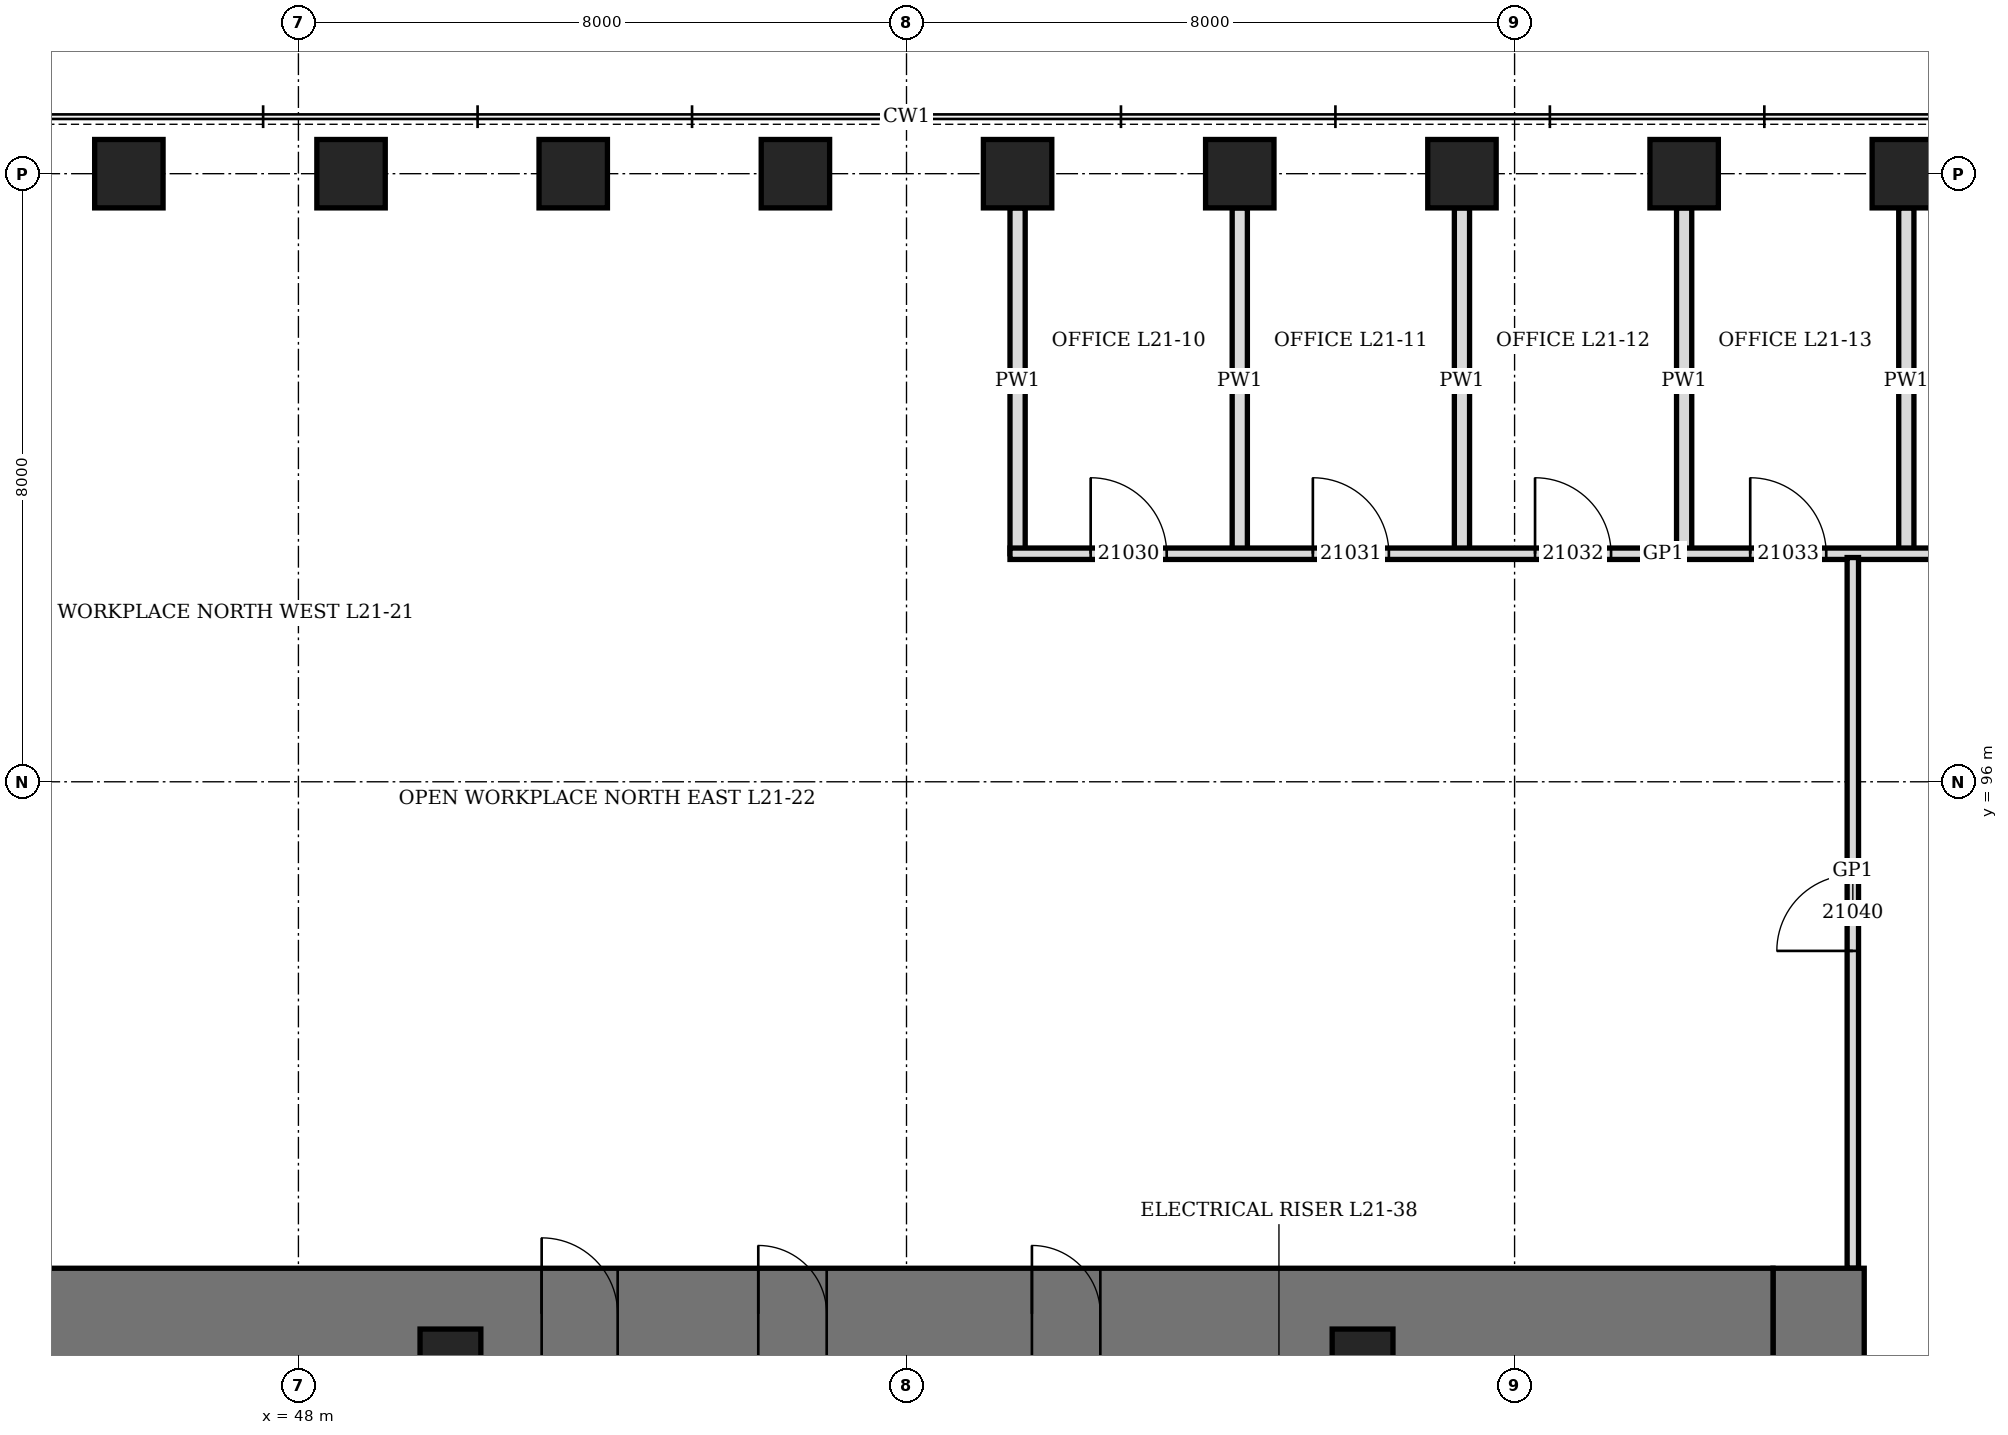
"""IFC4 building model, lengths in metres.
Left out: names, types, materials, properties, quantities, classifications, styles, units other than length and angle.
Written with IfcOpenShell. Run it as: python <this file> out.ifc"""

import sys

from ifc_helpers import new_model, si_unit, direction, frame, frame_2d, origin, origin_2d, place, context, subcontext, project, spatial, rectangle, hollow_rectangle, extrude, element, fill, save


model = new_model("IFC4")
c1 = context("Model", 3, precision=1e-05, world=origin(), true_north=direction((0.0, 1.0)))
c2 = subcontext(c1, "Body", "Model", "MODEL_VIEW")
j1 = project(units=[si_unit("LENGTHUNIT", "METRE"), si_unit("PLANEANGLEUNIT", "RADIAN")], contexts=[c1])
p1 = place(None, origin())
s1 = spatial("IfcSite", under=j1, at=p1, CompositionType="ELEMENT")
p2 = place(p1, origin())
s2 = spatial("IfcBuilding", under=s1, at=p2, CompositionType="ELEMENT")
p3 = place(p2, frame((0.0, 0.0, 97.9)))
s3 = spatial("IfcBuildingStorey", under=s2, at=p3, CompositionType="ELEMENT", Elevation=97.9)
for number, where, z_axis, x_axis in (
    (1, (69.154, 104.0, 0.0), (0.0, 0.0, 1.0), (1.0, 0.0, 0.0)),
    (2, (66.231, 104.0, 0.0), (0.0, 0.0, 1.0), (1.0, 0.0, 0.0)),
    (3, (63.308, 104.0, 0.0), (0.0, 0.0, 1.0), (1.0, 0.0, 0.0)),
    (4, (60.385, 104.0, 0.0), (0.0, 0.0, 1.0), (1.0, 0.0, 0.0)),
    (5, (57.461, 104.0, 0.0), (0.0, 0.0, 1.0), (1.0, 0.0, 0.0)),
    (6, (54.539, 104.0, 0.0), (0.0, 0.0, 1.0), (1.0, 0.0, 0.0)),
    (7, (51.615, 104.0, 0.0), (0.0, 0.0, 1.0), (1.0, 0.0, 0.0)),
    (8, (48.692, 104.0, 0.0), (0.0, 0.0, 1.0), (1.0, 0.0, 0.0)),
    (9, (45.769, 104.0, 0.0), (0.0, 0.0, 1.0), (1.0, 0.0, 0.0)),
):
    element("IfcColumn", number, at=place(p3, frame(where, z_axis=z_axis, x_axis=x_axis)), inside=s3, PredefinedType="COLUMN", context=c2, shape_type="SweptSolid", body=[
        extrude(hollow_rectangle(XDim=0.9, YDim=0.9, WallThickness=0.12, at=origin_2d()), origin(), (0.0, 0.0, 1.0), 4.2),
    ])
p4 = place(p3, frame((68.0, 70.4, 0.0), z_axis=(0.0, 0.0, 1.0), x_axis=(0.0, 1.0, 0.0)))
e10 = element("IfcWall", 10, at=p4, inside=s3, PredefinedType="SHEAR", context=c2, shape_type="SweptSolid", body=[
    extrude(rectangle(XDim=19.2, YDim=1.2, at=frame_2d((9.6, 0.0))), origin(), (0.0, 0.0, 1.0), 4.2),
])
p5 = place(p4, frame((8.6, 0.0, 0.0)))
e11 = element("IfcOpeningElement", 11, at=p5, cuts=e10, PredefinedType="OPENING", context=c2, shape_type="SweptSolid", body=[
    extrude(rectangle(XDim=2.0, YDim=2.4, at=frame_2d((1.0, 1.2))), frame((0.0, 0.61, 0.0), z_axis=(0.0, -1.0, 0.0), x_axis=(1.0, 0.0, 0.0)), (0.0, 0.0, 1.0), 1.22),
])
p6 = place(p3, frame((44.6, 89.0, 0.0), z_axis=(0.0, 0.0, 1.0), x_axis=(1.0, 0.0, 0.0)))
e12 = element("IfcWall", 12, at=p6, inside=s3, PredefinedType="SHEAR", context=c2, shape_type="SweptSolid", body=[
    extrude(rectangle(XDim=22.8, YDim=1.2, at=frame_2d((11.4, 0.0))), origin(), (0.0, 0.0, 1.0), 4.2),
])
p7 = place(p6, frame((6.6, 0.0, 0.0)))
e13 = element("IfcOpeningElement", 13, at=p7, cuts=e12, PredefinedType="OPENING", context=c2, shape_type="SweptSolid", body=[
    extrude(rectangle(XDim=1.0, YDim=2.1, at=frame_2d((0.5, 1.05))), frame((0.0, 0.61, 0.0), z_axis=(0.0, -1.0, 0.0), x_axis=(1.0, 0.0, 0.0)), (0.0, 0.0, 1.0), 1.22),
])
p8 = place(p6, frame((9.45, 0.0, 0.0)))
e14 = element("IfcOpeningElement", 14, at=p8, cuts=e12, PredefinedType="OPENING", context=c2, shape_type="SweptSolid", body=[
    extrude(rectangle(XDim=0.9, YDim=2.1, at=frame_2d((0.45, 1.05))), frame((0.0, 0.61, 0.0), z_axis=(0.0, -1.0, 0.0), x_axis=(1.0, 0.0, 0.0)), (0.0, 0.0, 1.0), 1.22),
])
p9 = place(p6, frame((13.05, 0.0, 0.0)))
e15 = element("IfcOpeningElement", 15, at=p9, cuts=e12, PredefinedType="OPENING", context=c2, shape_type="SweptSolid", body=[
    extrude(rectangle(XDim=0.9, YDim=2.1, at=frame_2d((0.45, 1.05))), frame((0.0, 0.61, 0.0), z_axis=(0.0, -1.0, 0.0), x_axis=(1.0, 0.0, 0.0)), (0.0, 0.0, 1.0), 1.22),
])
for number, where, z_axis, x_axis in (
    (16, (50.0, 88.4, 0.0), (0.0, 0.0, 1.0), (1.0, 0.0, 0.0)),
    (17, (62.0, 88.4, 0.0), (0.0, 0.0, 1.0), (1.0, 0.0, 0.0)),
):
    element("IfcColumn", number, at=place(p3, frame(where, z_axis=z_axis, x_axis=x_axis)), inside=s3, PredefinedType="COLUMN", context=c2, shape_type="SweptSolid", body=[
        extrude(hollow_rectangle(XDim=0.8, YDim=0.8, WallThickness=0.1, at=origin_2d()), origin(), (0.0, 0.0, 1.0), 4.2),
    ])
for number, where, z_axis, x_axis in (
    (18, (57.461, 99.0, 0.0), (0.0, 0.0, 1.0), (0.0, 1.0, 0.0)),
    (19, (60.385, 99.0, 0.0), (0.0, 0.0, 1.0), (0.0, 1.0, 0.0)),
    (20, (63.308, 99.0, 0.0), (0.0, 0.0, 1.0), (0.0, 1.0, 0.0)),
    (21, (66.231, 99.0, 0.0), (0.0, 0.0, 1.0), (0.0, 1.0, 0.0)),
    (22, (69.154, 99.0, 0.0), (0.0, 0.0, 1.0), (0.0, 1.0, 0.0)),
):
    element("IfcWall", number, at=place(p3, frame(where, z_axis=z_axis, x_axis=x_axis)), inside=s3, PredefinedType="PARTITIONING", context=c2, shape_type="SweptSolid", body=[
        extrude(rectangle(XDim=4.55, YDim=0.2, at=frame_2d((2.275, 0.0))), origin(), (0.0, 0.0, 1.0), 1.95),
    ])
p10 = place(p3, frame((57.362, 99.0, 0.0), z_axis=(0.0, 0.0, 1.0), x_axis=(1.0, 0.0, 0.0)))
e23 = element("IfcWall", 23, at=p10, inside=s3, PredefinedType="PARTITIONING", context=c2, shape_type="SweptSolid", body=[
    extrude(rectangle(XDim=17.188, YDim=0.15, at=frame_2d((8.594, 0.0))), origin(), (0.0, 0.0, 1.0), 3.95),
])
p11 = place(p10, frame((1.062, 0.0, 0.0)))
e24 = element("IfcOpeningElement", 24, at=p11, cuts=e23, PredefinedType="OPENING", context=c2, shape_type="SweptSolid", body=[
    extrude(rectangle(XDim=1.0, YDim=2.1, at=frame_2d((0.5, 1.05))), frame((0.0, 0.085, 0.0), z_axis=(0.0, -1.0, 0.0), x_axis=(1.0, 0.0, 0.0)), (0.0, 0.0, 1.0), 0.17),
])
p12 = place(p10, frame((3.985, 0.0, 0.0)))
e25 = element("IfcOpeningElement", 25, at=p12, cuts=e23, PredefinedType="OPENING", context=c2, shape_type="SweptSolid", body=[
    extrude(rectangle(XDim=1.0, YDim=2.1, at=frame_2d((0.5, 1.05))), frame((0.0, 0.085, 0.0), z_axis=(0.0, -1.0, 0.0), x_axis=(1.0, 0.0, 0.0)), (0.0, 0.0, 1.0), 0.17),
])
p13 = place(p10, frame((6.908, 0.0, 0.0)))
e26 = element("IfcOpeningElement", 26, at=p13, cuts=e23, PredefinedType="OPENING", context=c2, shape_type="SweptSolid", body=[
    extrude(rectangle(XDim=1.0, YDim=2.1, at=frame_2d((0.5, 1.05))), frame((0.0, 0.085, 0.0), z_axis=(0.0, -1.0, 0.0), x_axis=(1.0, 0.0, 0.0)), (0.0, 0.0, 1.0), 0.17),
])
p14 = place(p10, frame((9.739, 0.0, 0.0)))
e27 = element("IfcOpeningElement", 27, at=p14, cuts=e23, PredefinedType="OPENING", context=c2, shape_type="SweptSolid", body=[
    extrude(rectangle(XDim=1.0, YDim=2.1, at=frame_2d((0.5, 1.05))), frame((0.0, 0.085, 0.0), z_axis=(0.0, -1.0, 0.0), x_axis=(1.0, 0.0, 0.0)), (0.0, 0.0, 1.0), 0.17),
])
p15 = place(p10, frame((12.754, 0.0, 0.0)))
e28 = element("IfcOpeningElement", 28, at=p15, cuts=e23, PredefinedType="OPENING", context=c2, shape_type="SweptSolid", body=[
    extrude(rectangle(XDim=1.0, YDim=2.1, at=frame_2d((0.5, 1.05))), frame((0.0, 0.085, 0.0), z_axis=(0.0, -1.0, 0.0), x_axis=(1.0, 0.0, 0.0)), (0.0, 0.0, 1.0), 0.17),
])
p16 = place(p10, frame((15.677, 0.0, 0.0)))
e29 = element("IfcOpeningElement", 29, at=p16, cuts=e23, PredefinedType="OPENING", context=c2, shape_type="SweptSolid", body=[
    extrude(rectangle(XDim=1.0, YDim=2.4, at=frame_2d((0.5, 1.2))), frame((0.0, 0.085, 0.0), z_axis=(0.0, -1.0, 0.0), x_axis=(1.0, 0.0, 0.0)), (0.0, 0.0, 1.0), 0.17),
])
p17 = place(p3, frame((68.45, 89.6, 0.0), z_axis=(0.0, 0.0, 1.0), x_axis=(0.0, 1.0, 0.0)))
e30 = element("IfcWall", 30, at=p17, inside=s3, PredefinedType="PARTITIONING", context=c2, shape_type="SweptSolid", body=[
    extrude(rectangle(XDim=9.35, YDim=0.15, at=frame_2d((4.675, 0.0))), origin(), (0.0, 0.0, 1.0), 3.95),
])
p18 = place(p17, frame((4.175, 0.0, 0.0)))
e31 = element("IfcOpeningElement", 31, at=p18, cuts=e30, PredefinedType="OPENING", context=c2, shape_type="SweptSolid", body=[
    extrude(rectangle(XDim=1.0, YDim=2.4, at=frame_2d((0.5, 1.2))), frame((0.0, 0.085, 0.0), z_axis=(0.0, -1.0, 0.0), x_axis=(1.0, 0.0, 0.0)), (0.0, 0.0, 1.0), 0.17),
])
p19 = place(p7, origin())
e32 = element("IfcDoor", 32, at=p19, inside=s3, OperationType="SINGLE_SWING_LEFT", PredefinedType="DOOR", context=c2, shape_type="SweptSolid", body=[
    extrude(rectangle(XDim=1.0, YDim=2.1, at=frame_2d((0.5, 1.05))), frame((0.0, 0.35, 0.0), z_axis=(0.0, -1.0, 0.0), x_axis=(1.0, 0.0, 0.0)), (0.0, 0.0, 1.0), 0.7),
])
fill(e13, e32)
p20 = place(p8, origin())
e33 = element("IfcDoor", 33, at=p20, inside=s3, OperationType="SINGLE_SWING_LEFT", PredefinedType="DOOR", context=c2, shape_type="SweptSolid", body=[
    extrude(rectangle(XDim=0.9, YDim=2.1, at=frame_2d((0.45, 1.05))), frame((0.0, 0.35, 0.0), z_axis=(0.0, -1.0, 0.0), x_axis=(1.0, 0.0, 0.0)), (0.0, 0.0, 1.0), 0.7),
])
fill(e14, e33)
p21 = place(p9, origin())
e34 = element("IfcDoor", 34, at=p21, inside=s3, OperationType="SINGLE_SWING_LEFT", PredefinedType="DOOR", context=c2, shape_type="SweptSolid", body=[
    extrude(rectangle(XDim=0.9, YDim=2.1, at=frame_2d((0.45, 1.05))), frame((0.0, 0.35, 0.0), z_axis=(0.0, -1.0, 0.0), x_axis=(1.0, 0.0, 0.0)), (0.0, 0.0, 1.0), 0.7),
])
fill(e15, e34)
p22 = place(p11, origin())
e35 = element("IfcDoor", 35, at=p22, inside=s3, OperationType="SINGLE_SWING_LEFT", PredefinedType="DOOR", context=c2, shape_type="SweptSolid", body=[
    extrude(rectangle(XDim=1.0, YDim=2.1, at=frame_2d((0.5, 1.05))), frame((0.0, 0.075, 0.0), z_axis=(0.0, -1.0, 0.0), x_axis=(1.0, 0.0, 0.0)), (0.0, 0.0, 1.0), 0.149),
])
fill(e24, e35)
p23 = place(p12, origin())
e36 = element("IfcDoor", 36, at=p23, inside=s3, OperationType="SINGLE_SWING_LEFT", PredefinedType="DOOR", context=c2, shape_type="SweptSolid", body=[
    extrude(rectangle(XDim=1.0, YDim=2.1, at=frame_2d((0.5, 1.05))), frame((0.0, 0.075, 0.0), z_axis=(0.0, -1.0, 0.0), x_axis=(1.0, 0.0, 0.0)), (0.0, 0.0, 1.0), 0.149),
])
fill(e25, e36)
p24 = place(p13, origin())
e37 = element("IfcDoor", 37, at=p24, inside=s3, OperationType="SINGLE_SWING_LEFT", PredefinedType="DOOR", context=c2, shape_type="SweptSolid", body=[
    extrude(rectangle(XDim=1.0, YDim=2.1, at=frame_2d((0.5, 1.05))), frame((0.0, 0.075, 0.0), z_axis=(0.0, -1.0, 0.0), x_axis=(1.0, 0.0, 0.0)), (0.0, 0.0, 1.0), 0.149),
])
fill(e26, e37)
p25 = place(p14, origin())
e38 = element("IfcDoor", 38, at=p25, inside=s3, OperationType="SINGLE_SWING_LEFT", PredefinedType="DOOR", context=c2, shape_type="SweptSolid", body=[
    extrude(rectangle(XDim=1.0, YDim=2.1, at=frame_2d((0.5, 1.05))), frame((0.0, 0.075, 0.0), z_axis=(0.0, -1.0, 0.0), x_axis=(1.0, 0.0, 0.0)), (0.0, 0.0, 1.0), 0.149),
])
fill(e27, e38)
p26 = place(p18, origin())
e39 = element("IfcDoor", 39, at=p26, inside=s3, OperationType="SINGLE_SWING_RIGHT", PredefinedType="DOOR", context=c2, shape_type="SweptSolid", body=[
    extrude(rectangle(XDim=1.0, YDim=2.4, at=frame_2d((0.5, 1.2))), frame((0.0, 0.075, 0.0), z_axis=(0.0, -1.0, 0.0), x_axis=(1.0, 0.0, 0.0)), (0.0, 0.0, 1.0), 0.149),
])
fill(e31, e39)
save(model, sys.argv[1])
